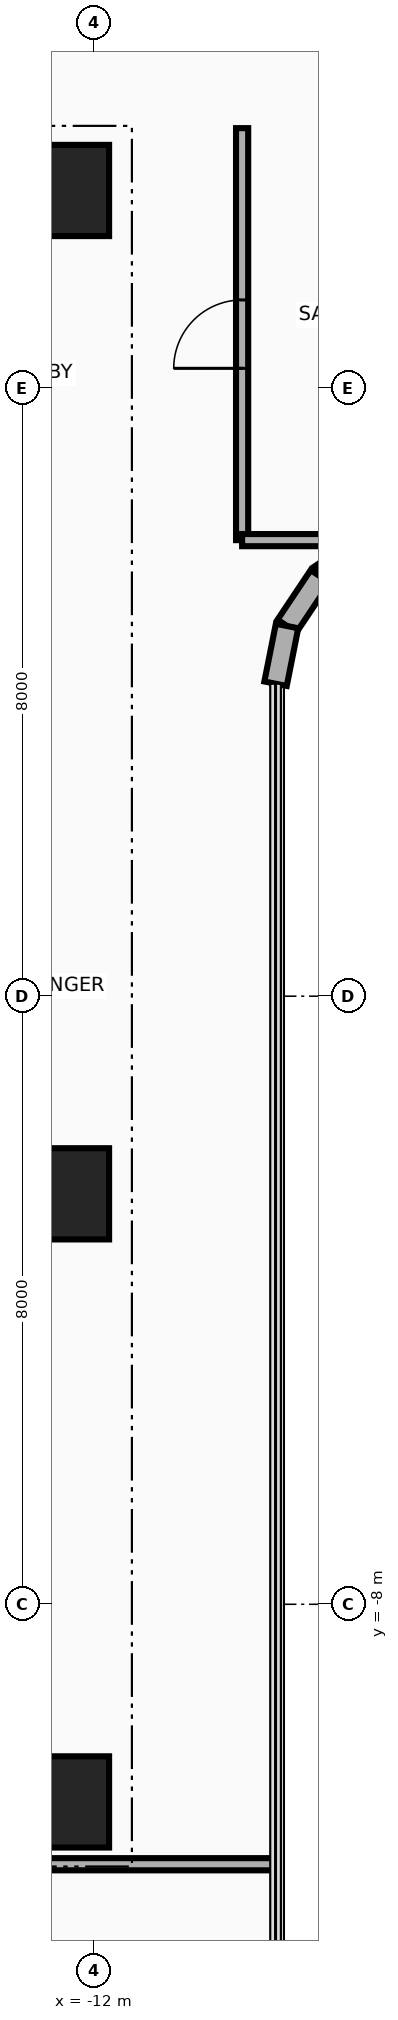
"""IFC4 building model, lengths in metres.
Left out: names, types, materials, properties, quantities, classifications, styles, units other than length and angle.
Written with IfcOpenShell. Run it as: python <this file> out.ifc"""

import sys

from ifc_helpers import new_model, si_unit, direction, frame, frame_2d, origin, origin_2d, place, context, subcontext, project, spatial, rectangle, extrude, source, transform, mapped, element, fill, save


model = new_model("IFC4")
c1 = context("Model", 3, precision=1e-05, world=origin(), true_north=direction((0.0, 1.0)))
c2 = subcontext(c1, "Body", "Model", "MODEL_VIEW")
j1 = project(units=[si_unit("LENGTHUNIT", "METRE"), si_unit("PLANEANGLEUNIT", "RADIAN")], contexts=[c1])
p1 = place(None, origin())
s1 = spatial("IfcSite", under=j1, at=p1, CompositionType="ELEMENT")
p2 = place(p1, origin())
s2 = spatial("IfcBuilding", under=s1, at=p2, CompositionType="ELEMENT")
p3 = place(p2, frame((0.0, 0.0, 164.9)))
s3 = spatial("IfcBuildingStorey", under=s2, at=p3, CompositionType="ELEMENT", Elevation=164.9)
for number, where, z_axis, x_axis in (
    (1, (-22.65, 10.8, 0.0), (0.0, 0.0, 1.0), (1.0, 0.0, 0.0)),
    (2, (-22.65, -10.8, 0.0), (0.0, 0.0, 1.0), (1.0, 0.0, 0.0)),
):
    element("IfcWall", number, at=place(p3, frame(where, z_axis=z_axis, x_axis=x_axis)), inside=s3, PredefinedType="SHEAR", context=c2, shape_type="SweptSolid", body=[
        extrude(rectangle(XDim=10.25, YDim=0.55, at=frame_2d((5.125, 0.0))), origin(), (0.0, 0.0, 1.0), 3.46),
    ])
m1 = source(origin(), c2, "Body", "SweptSolid", [
    extrude(rectangle(XDim=1.2, YDim=1.2, at=origin_2d()), origin(), (0.0, 0.0, 1.0), 3.7),
])
for number, where, z_axis, x_axis in (
    (3, (-12.4, -10.6, 0.0), (0.0, 0.0, 1.0), (1.0, 0.0, 0.0)),
    (4, (-12.4, -2.6, 0.0), (0.0, 0.0, 1.0), (1.0, 0.0, 0.0)),
    (5, (-12.4, 10.6, 0.0), (0.0, 0.0, 1.0), (1.0, 0.0, 0.0)),
):
    element("IfcColumn", number, at=place(p3, frame(where, z_axis=z_axis, x_axis=x_axis)), inside=s3, PredefinedType="COLUMN", context=c2, shape_type="MappedRepresentation", body=[
        mapped(m1, transform((0.0, 0.0, 0.0), x_axis=(1.0, 0.0, 0.0), y_axis=(0.0, 1.0, 0.0), z_axis=(0.0, 0.0, 1.0), scale=1.0)),
    ])
for number, where, z_axis, x_axis in (
    (6, (-8.37, 5.959, 0.0), (0.0, 0.0, 1.0), (-0.831, -0.556, 0.0)),
    (7, (-9.023, 5.523, 0.0), (0.0, 0.0, 1.0), (-0.556, -0.831, 0.0)),
):
    element("IfcWall", number, at=place(p3, frame(where, z_axis=z_axis, x_axis=x_axis)), inside=s3, PredefinedType="SOLIDWALL", context=c2, shape_type="SweptSolid", body=[
        extrude(rectangle(XDim=0.785, YDim=0.3, at=frame_2d((0.393, 0.0))), origin(), (0.0, 0.0, 1.0), 3.46),
    ])
p4 = place(p3, frame((-9.459, 4.87, 0.0), z_axis=(0.0, 0.0, 1.0), x_axis=(-0.195206365311, -0.98076219082, 0.0)))
e8 = element("IfcWall", 8, at=p4, inside=s3, PredefinedType="SOLIDWALL", context=c2, shape_type="SweptSolid", body=[
    extrude(rectangle(XDim=0.774, YDim=0.3, at=frame_2d((0.387, 0.0))), origin(), (0.0, 0.0, 1.0), 3.46),
])
p5 = place(p3, frame((-23.45, -11.42, 0.0), z_axis=(0.0, 0.0, 1.0), x_axis=(1.0, 0.0, 0.0)))
e9 = element("IfcWall", 9, at=p5, inside=s3, PredefinedType="PARTITIONING", context=c2, shape_type="SweptSolid", body=[
    extrude(rectangle(XDim=13.84, YDim=0.16, at=frame_2d((6.92, 0.0))), origin(), (0.0, 0.0, 1.0), 2.834),
])
p6 = place(p3, frame((-10.05, 6.0, 0.0), z_axis=(0.0, 0.0, 1.0), x_axis=(0.0, 1.0, 0.0)))
e10 = element("IfcWall", 10, at=p6, inside=s3, PredefinedType="PARTITIONING", context=c2, shape_type="SweptSolid", body=[
    extrude(rectangle(XDim=5.42, YDim=0.16, at=frame_2d((2.71, 0.0))), origin(), (0.0, 0.0, 1.0), 3.46),
])
p7 = place(p6, frame((2.26, 0.0, 0.0)))
e11 = element("IfcOpeningElement", 11, at=p7, cuts=e10, PredefinedType="OPENING", context=c2, shape_type="SweptSolid", body=[
    extrude(rectangle(XDim=0.9, YDim=2.1, at=frame_2d((0.45, 1.05))), frame((0.0, 0.095, 0.0), z_axis=(0.0, -1.0, 0.0), x_axis=(1.0, 0.0, 0.0)), (0.0, 0.0, 1.0), 0.19),
])
p8 = place(p3, frame((-10.05, 6.0, 0.0), z_axis=(0.0, 0.0, 1.0), x_axis=(1.0, 0.0, 0.0)))
e12 = element("IfcWall", 12, at=p8, inside=s3, PredefinedType="PARTITIONING", context=c2, shape_type="SweptSolid", body=[
    extrude(rectangle(XDim=1.516, YDim=0.16, at=frame_2d((0.758, 0.0))), origin(), (0.0, 0.0, 1.0), 3.46),
])
p9 = place(p7, origin())
e13 = element("IfcDoor", 13, at=p9, inside=s3, OperationType="SINGLE_SWING_RIGHT", PredefinedType="DOOR", context=c2, shape_type="SweptSolid", body=[
    extrude(rectangle(XDim=0.9, YDim=2.1, at=frame_2d((0.45, 1.05))), frame((0.0, 0.025, 0.0), z_axis=(0.0, -1.0, 0.0), x_axis=(1.0, 0.0, 0.0)), (0.0, 0.0, 1.0), 0.05),
])
fill(e11, e13)
save(model, sys.argv[1])
